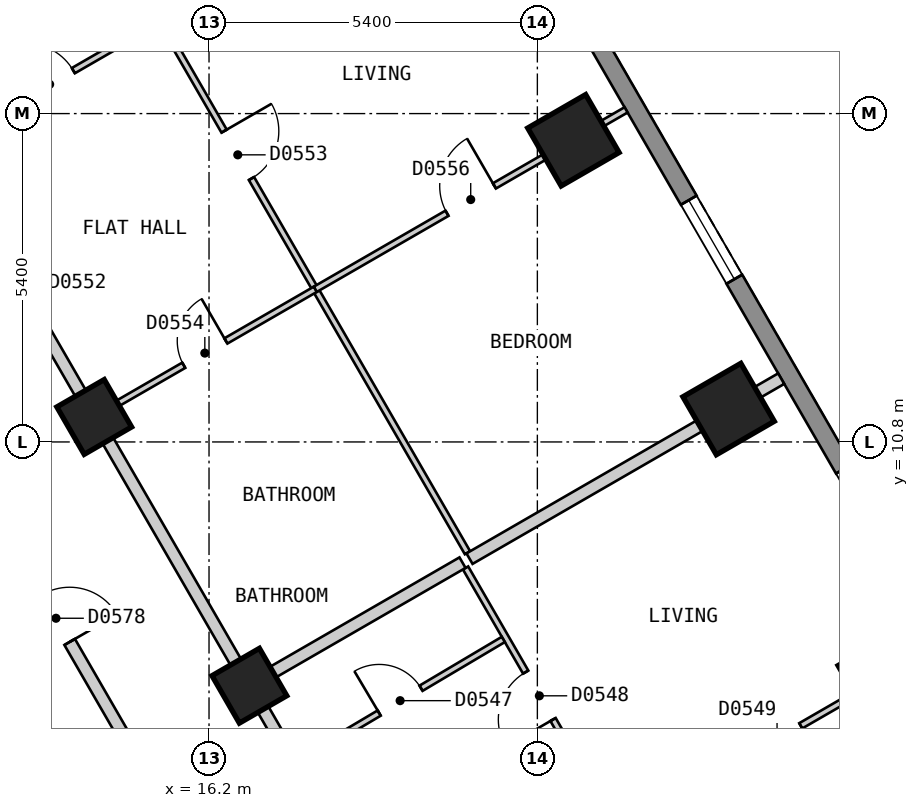
"""IFC4 building model, lengths in metres.
Left out: names, types, materials, properties, quantities, classifications, styles, units other than length and angle.
Written with IfcOpenShell. Run it as: python <this file> out.ifc"""

import sys

from ifc_helpers import new_model, si_unit, direction, frame, frame_2d, origin, origin_2d, place, context, subcontext, project, spatial, polyline, rectangle, outline, extrude, element, fill, save


model = new_model("IFC4")
c1 = context("Model", 3, precision=1e-05, world=origin(), true_north=direction((0.0, 1.0)))
c2 = subcontext(c1, "Body", "Model", "MODEL_VIEW")
j1 = project(units=[si_unit("LENGTHUNIT", "METRE"), si_unit("PLANEANGLEUNIT", "RADIAN")], contexts=[c1])
p1 = place(None, origin())
s1 = spatial("IfcSite", under=j1, at=p1, CompositionType="ELEMENT")
p2 = place(p1, origin())
s2 = spatial("IfcBuilding", under=s1, at=p2, CompositionType="ELEMENT")
p3 = place(p2, frame((0.0, 0.0, 56.4)))
s3 = spatial("IfcBuildingStorey", under=s2, at=p3, CompositionType="ELEMENT", Elevation=56.4)
for number, where, z_axis, x_axis in (
    (1, (27.297, 6.921, 0.0), (0.0, 0.0, 1.0), (-0.5, 0.866, 0.0)),
    (2, (24.745, 11.341, 0.0), (0.0, 0.0, 1.0), (-0.5, 0.866, 0.0)),
    (3, (22.193, 15.761, 0.0), (0.0, 0.0, 1.0), (-0.5, 0.866, 0.0)),
):
    element("IfcColumn", number, at=place(p3, frame(where, z_axis=z_axis, x_axis=x_axis)), inside=s3, PredefinedType="COLUMN", context=c2, shape_type="SweptSolid", body=[
        extrude(rectangle(XDim=1.1, YDim=1.1, at=origin_2d()), origin(), (0.0, 0.0, 1.0), 3.0),
    ])
for number, where, z_axis, x_axis in (
    (4, (16.864, 6.791, 0.0), (0.0, 0.0, 1.0), (-0.5, 0.866, 0.0)),
    (5, (14.312, 11.211, 0.0), (0.0, 0.0, 1.0), (-0.5, 0.866, 0.0)),
):
    element("IfcColumn", number, at=place(p3, frame(where, z_axis=z_axis, x_axis=x_axis)), inside=s3, PredefinedType="COLUMN", context=c2, shape_type="SweptSolid", body=[
        extrude(rectangle(XDim=0.9, YDim=0.9, at=origin_2d()), origin(), (0.0, 0.0, 1.0), 3.0),
    ])
p4 = place(p3, frame((31.22, 2.425, 0.0), z_axis=(0.0, 0.0, 1.0), x_axis=(-0.500001938803, 0.866024284413, 0.0)))
e6 = element("IfcWall", 6, at=p4, inside=s3, PredefinedType="SOLIDWALL", context=c2, shape_type="SweptSolid", body=[
    extrude(outline(polyline([(0.0, -0.15), (27.02, -0.15), (26.94, 0.15), (0.08, 0.15), (0.0, -0.15)])), origin(), (0.0, 0.0, 1.0), 2.7),
])
p5 = place(p4, frame((2.553, 0.0, 0.15)))
e7 = element("IfcOpeningElement", 7, at=p5, cuts=e6, PredefinedType="OPENING", context=c2, shape_type="SweptSolid", body=[
    extrude(rectangle(XDim=1.5, YDim=2.1, at=frame_2d((0.75, 1.05))), frame((0.0, 0.16, 0.0), z_axis=(0.0, -1.0, 0.0), x_axis=(1.0, 0.0, 0.0)), (0.0, 0.0, 1.0), 0.32),
])
p6 = place(p4, frame((7.657, 0.0, 0.15)))
e8 = element("IfcOpeningElement", 8, at=p6, cuts=e6, PredefinedType="OPENING", context=c2, shape_type="SweptSolid", body=[
    extrude(rectangle(XDim=1.5, YDim=2.1, at=frame_2d((0.75, 1.05))), frame((0.0, 0.16, 0.0), z_axis=(0.0, -1.0, 0.0), x_axis=(1.0, 0.0, 0.0)), (0.0, 0.0, 1.0), 0.32),
])
p7 = place(p4, frame((12.761, 0.0, 0.15)))
e9 = element("IfcOpeningElement", 9, at=p7, cuts=e6, PredefinedType="OPENING", context=c2, shape_type="SweptSolid", body=[
    extrude(rectangle(XDim=1.5, YDim=2.1, at=frame_2d((0.75, 1.05))), frame((0.0, 0.16, 0.0), z_axis=(0.0, -1.0, 0.0), x_axis=(1.0, 0.0, 0.0)), (0.0, 0.0, 1.0), 0.32),
])
p8 = place(p4, frame((17.865, 0.0, 0.15)))
e10 = element("IfcOpeningElement", 10, at=p8, cuts=e6, PredefinedType="OPENING", context=c2, shape_type="SweptSolid", body=[
    extrude(rectangle(XDim=1.5, YDim=2.1, at=frame_2d((0.75, 1.05))), frame((0.0, 0.16, 0.0), z_axis=(0.0, -1.0, 0.0), x_axis=(1.0, 0.0, 0.0)), (0.0, 0.0, 1.0), 0.32),
])
p9 = place(p4, frame((22.969, 0.0, 0.15)))
e11 = element("IfcOpeningElement", 11, at=p9, cuts=e6, PredefinedType="OPENING", context=c2, shape_type="SweptSolid", body=[
    extrude(rectangle(XDim=1.5, YDim=2.1, at=frame_2d((0.75, 1.05))), frame((0.0, 0.16, 0.0), z_axis=(0.0, -1.0, 0.0), x_axis=(1.0, 0.0, 0.0)), (0.0, 0.0, 1.0), 0.32),
])
p10 = place(p3, frame((9.18, 15.7, 0.0), z_axis=(0.0, 0.0, 1.0), x_axis=(0.500003652032, -0.866023295272, 0.0)))
e12 = element("IfcWall", 12, at=p10, inside=s3, PredefinedType="PARTITIONING", context=c2, shape_type="SweptSolid", body=[
    extrude(rectangle(XDim=18.012, YDim=0.2, at=frame_2d((9.006, 0.0))), origin(), (0.0, 0.0, 1.0), 2.7),
])
p11 = place(p10, frame((8.556, 0.0, 0.0)))
e13 = element("IfcOpeningElement", 13, at=p11, cuts=e12, PredefinedType="OPENING", context=c2, shape_type="SweptSolid", body=[
    extrude(rectangle(XDim=0.9, YDim=2.1, at=frame_2d((0.45, 1.05))), frame((0.0, 0.11, 0.0), z_axis=(0.0, -1.0, 0.0), x_axis=(1.0, 0.0, 0.0)), (0.0, 0.0, 1.0), 0.22),
])
p12 = place(p3, frame((10.45, 17.9, 0.0), z_axis=(0.0, 0.0, 1.0), x_axis=(0.500034352617, -0.866005569383, 0.0)))
e14 = element("IfcWall", 14, at=p12, inside=s3, PredefinedType="PARTITIONING", context=c2, shape_type="SweptSolid", body=[
    extrude(rectangle(XDim=20.553, YDim=0.2, at=frame_2d((10.276, 0.0))), origin(), (0.0, 0.0, 1.0), 2.7),
])
p13 = place(p12, frame((14.902, 0.0, 0.0)))
e15 = element("IfcOpeningElement", 15, at=p13, cuts=e14, PredefinedType="OPENING", context=c2, shape_type="SweptSolid", body=[
    extrude(rectangle(XDim=1.0, YDim=2.1, at=frame_2d((0.5, 1.05))), frame((0.0, 0.11, 0.0), z_axis=(0.0, -1.0, 0.0), x_axis=(1.0, 0.0, 0.0)), (0.0, 0.0, 1.0), 0.22),
])
p14 = place(p12, frame((4.671, 0.0, 0.0)))
e16 = element("IfcOpeningElement", 16, at=p14, cuts=e14, PredefinedType="OPENING", context=c2, shape_type="SweptSolid", body=[
    extrude(rectangle(XDim=1.0, YDim=2.1, at=frame_2d((0.5, 1.05))), frame((0.0, 0.11, 0.0), z_axis=(0.0, -1.0, 0.0), x_axis=(1.0, 0.0, 0.0)), (0.0, 0.0, 1.0), 0.22),
])
p15 = place(p3, frame((20.419, 8.728, 0.0), z_axis=(0.0, 0.0, 1.0), x_axis=(0.499958946799, -0.866049104564, 0.0)))
e17 = element("IfcWall", 17, at=p15, inside=s3, PredefinedType="PARTITIONING", context=c2, shape_type="SweptSolid", body=[
    extrude(rectangle(XDim=5.004, YDim=0.1, at=frame_2d((2.502, 0.0))), origin(), (0.0, 0.0, 1.0), 2.7),
])
p16 = place(p15, frame((1.978, 0.0, 0.0)))
e18 = element("IfcOpeningElement", 18, at=p16, cuts=e17, PredefinedType="OPENING", context=c2, shape_type="SweptSolid", body=[
    extrude(rectangle(XDim=0.9, YDim=2.1, at=frame_2d((0.45, 1.05))), frame((0.0, 0.06, 0.0), z_axis=(0.0, -1.0, 0.0), x_axis=(1.0, 0.0, 0.0)), (0.0, 0.0, 1.0), 0.12),
])
p17 = place(p3, frame((12.875, 22.1, 0.0), z_axis=(0.0, 0.0, 1.0), x_axis=(0.499994897061, -0.866028349948, 0.0)))
e19 = element("IfcWall", 19, at=p17, inside=s3, PredefinedType="PARTITIONING", context=c2, shape_type="SweptSolid", body=[
    extrude(rectangle(XDim=15.152, YDim=0.1, at=frame_2d((7.576, 0.0))), origin(), (0.0, 0.0, 1.0), 2.7),
])
p18 = place(p17, frame((7.146, 0.0, 0.0)))
e20 = element("IfcOpeningElement", 20, at=p18, cuts=e19, PredefinedType="OPENING", context=c2, shape_type="SweptSolid", body=[
    extrude(rectangle(XDim=0.9, YDim=2.1, at=frame_2d((0.45, 1.05))), frame((0.0, 0.06, 0.0), z_axis=(0.0, -1.0, 0.0), x_axis=(1.0, 0.0, 0.0)), (0.0, 0.0, 1.0), 0.12),
])
p19 = place(p3, frame((19.503, 2.421, 0.0), z_axis=(0.0, 0.0, 1.0), x_axis=(0.866065245018, 0.499930986609, 0.0)))
e21 = element("IfcWall", 21, at=p19, inside=s3, PredefinedType="PARTITIONING", context=c2, shape_type="SweptSolid", body=[
    extrude(rectangle(XDim=10.0, YDim=0.1, at=frame_2d((5.0, 0.0))), origin(), (0.0, 0.0, 1.0), 2.7),
])
p20 = place(p19, frame((6.523, 0.0, 0.0)))
e22 = element("IfcOpeningElement", 22, at=p20, cuts=e21, PredefinedType="OPENING", context=c2, shape_type="SweptSolid", body=[
    extrude(rectangle(XDim=0.9, YDim=2.1, at=frame_2d((0.45, 1.05))), frame((0.0, 0.06, 0.0), z_axis=(0.0, -1.0, 0.0), x_axis=(1.0, 0.0, 0.0)), (0.0, 0.0, 1.0), 0.12),
])
p21 = place(p3, frame((11.847, 15.681, 0.0), z_axis=(0.0, 0.0, 1.0), x_axis=(0.865980278416, 0.500078151287, 0.0)))
e23 = element("IfcWall", 23, at=p21, inside=s3, PredefinedType="PARTITIONING", context=c2, shape_type="SweptSolid", body=[
    extrude(rectangle(XDim=4.099, YDim=0.1, at=frame_2d((2.05, 0.0))), origin(), (0.0, 0.0, 1.0), 2.7),
])
p22 = place(p21, frame((1.55, 0.0, 0.0)))
e24 = element("IfcOpeningElement", 24, at=p22, cuts=e23, PredefinedType="OPENING", context=c2, shape_type="SweptSolid", body=[
    extrude(rectangle(XDim=0.9, YDim=2.1, at=frame_2d((0.45, 1.05))), frame((0.0, 0.06, 0.0), z_axis=(0.0, -1.0, 0.0), x_axis=(1.0, 0.0, 0.0)), (0.0, 0.0, 1.0), 0.12),
])
p23 = place(p3, frame((14.399, 11.261, 0.0), z_axis=(0.0, 0.0, 1.0), x_axis=(0.865980278416, 0.500078151287, 0.0)))
e25 = element("IfcWall", 25, at=p23, inside=s3, PredefinedType="PARTITIONING", context=c2, shape_type="SweptSolid", body=[
    extrude(rectangle(XDim=4.099, YDim=0.1, at=frame_2d((2.05, 0.0))), origin(), (0.0, 0.0, 1.0), 2.7),
])
p24 = place(p23, frame((1.6, 0.0, 0.0)))
e26 = element("IfcOpeningElement", 26, at=p24, cuts=e25, PredefinedType="OPENING", context=c2, shape_type="SweptSolid", body=[
    extrude(rectangle(XDim=0.8, YDim=2.1, at=frame_2d((0.4, 1.05))), frame((0.0, 0.06, 0.0), z_axis=(0.0, -1.0, 0.0), x_axis=(1.0, 0.0, 0.0)), (0.0, 0.0, 1.0), 0.12),
])
p25 = place(p3, frame((17.688, 5.564, 0.0), z_axis=(0.0, 0.0, 1.0), x_axis=(0.860107296662, 0.510113162179, 0.0)))
e27 = element("IfcWall", 27, at=p25, inside=s3, PredefinedType="PARTITIONING", context=c2, shape_type="SweptSolid", body=[
    extrude(rectangle(XDim=3.897, YDim=0.1, at=frame_2d((1.949, 0.0))), origin(), (0.0, 0.0, 1.0), 2.7),
])
p26 = place(p25, frame((1.524, 0.0, 0.0)))
e28 = element("IfcOpeningElement", 28, at=p26, cuts=e27, PredefinedType="OPENING", context=c2, shape_type="SweptSolid", body=[
    extrude(rectangle(XDim=0.8, YDim=2.1, at=frame_2d((0.4, 1.05))), frame((0.0, 0.06, 0.0), z_axis=(0.0, -1.0, 0.0), x_axis=(1.0, 0.0, 0.0)), (0.0, 0.0, 1.0), 0.12),
])
p27 = place(p3, frame((16.95, 6.841, 0.0), z_axis=(0.0, 0.0, 1.0), x_axis=(0.866031112038, 0.499990112884, 0.0)))
e29 = element("IfcWall", 29, at=p27, inside=s3, PredefinedType="PARTITIONING", context=c2, shape_type="SweptSolid", body=[
    extrude(rectangle(XDim=3.948, YDim=0.2, at=frame_2d((1.974, 0.0))), origin(), (0.0, 0.0, 1.0), 2.7),
])
p28 = place(p3, frame((20.484, 8.881, 0.0), z_axis=(0.0, 0.0, 1.0), x_axis=(0.866000821391, 0.500042575537, 0.0)))
e30 = element("IfcWall", 30, at=p28, inside=s3, PredefinedType="PARTITIONING", context=c2, shape_type="SweptSolid", body=[
    extrude(rectangle(XDim=5.919, YDim=0.2, at=frame_2d((2.96, 0.0))), origin(), (0.0, 0.0, 1.0), 2.7),
])
p29 = place(p3, frame((17.949, 13.311, 0.0), z_axis=(0.0, 0.0, 1.0), x_axis=(0.866052608538, 0.499952877023, 0.0)))
e31 = element("IfcWall", 31, at=p29, inside=s3, PredefinedType="PARTITIONING", context=c2, shape_type="SweptSolid", body=[
    extrude(rectangle(XDim=5.9, YDim=0.1, at=frame_2d((2.95, 0.0))), origin(), (0.0, 0.0, 1.0), 2.7),
])
p30 = place(p29, frame((2.5, 0.0, 0.0)))
e32 = element("IfcOpeningElement", 32, at=p30, cuts=e31, PredefinedType="OPENING", context=c2, shape_type="SweptSolid", body=[
    extrude(rectangle(XDim=0.9, YDim=2.1, at=frame_2d((0.45, 1.05))), frame((0.0, 0.06, 0.0), z_axis=(0.0, -1.0, 0.0), x_axis=(1.0, 0.0, 0.0)), (0.0, 0.0, 1.0), 0.12),
])
p31 = place(p7, origin())
e33 = element("IfcWindow", 33, at=p31, inside=s3, PartitioningType="SINGLE_PANEL", PredefinedType="WINDOW", context=c2, shape_type="SweptSolid", body=[
    extrude(rectangle(XDim=1.5, YDim=2.1, at=frame_2d((0.75, 1.05))), frame((0.0, 0.03, 0.0), z_axis=(0.0, -1.0, 0.0), x_axis=(1.0, 0.0, 0.0)), (0.0, 0.0, 1.0), 0.06),
])
fill(e9, e33)
p32 = place(p26, origin())
e34 = element("IfcDoor", 34, at=p32, inside=s3, OperationType="SINGLE_SWING_LEFT", PredefinedType="DOOR", context=c2, shape_type="SweptSolid", body=[
    extrude(rectangle(XDim=0.8, YDim=2.1, at=frame_2d((0.4, 1.05))), frame((0.0, 0.025, 0.0), z_axis=(0.0, -1.0, 0.0), x_axis=(1.0, 0.0, 0.0)), (0.0, 0.0, 1.0), 0.05),
])
fill(e28, e34)
p33 = place(p16, origin())
e35 = element("IfcDoor", 35, at=p33, inside=s3, OperationType="SINGLE_SWING_RIGHT", PredefinedType="DOOR", context=c2, shape_type="SweptSolid", body=[
    extrude(rectangle(XDim=0.9, YDim=2.1, at=frame_2d((0.45, 1.05))), frame((0.0, 0.025, 0.0), z_axis=(0.0, -1.0, 0.0), x_axis=(1.0, 0.0, 0.0)), (0.0, 0.0, 1.0), 0.05),
])
fill(e18, e35)
p34 = place(p20, origin())
e36 = element("IfcDoor", 36, at=p34, inside=s3, OperationType="SINGLE_SWING_LEFT", PredefinedType="DOOR", context=c2, shape_type="SweptSolid", body=[
    extrude(rectangle(XDim=0.9, YDim=2.1, at=frame_2d((0.45, 1.05))), frame((0.0, 0.025, 0.0), z_axis=(0.0, -1.0, 0.0), x_axis=(1.0, 0.0, 0.0)), (0.0, 0.0, 1.0), 0.05),
])
fill(e22, e36)
p35 = place(p18, origin())
e37 = element("IfcDoor", 37, at=p35, inside=s3, OperationType="SINGLE_SWING_LEFT", PredefinedType="DOOR", context=c2, shape_type="SweptSolid", body=[
    extrude(rectangle(XDim=0.9, YDim=2.1, at=frame_2d((0.45, 1.05))), frame((0.0, 0.025, 0.0), z_axis=(0.0, -1.0, 0.0), x_axis=(1.0, 0.0, 0.0)), (0.0, 0.0, 1.0), 0.05),
])
fill(e20, e37)
p36 = place(p24, origin())
e38 = element("IfcDoor", 38, at=p36, inside=s3, OperationType="SINGLE_SWING_RIGHT", PredefinedType="DOOR", context=c2, shape_type="SweptSolid", body=[
    extrude(rectangle(XDim=0.8, YDim=2.1, at=frame_2d((0.4, 1.05))), frame((0.0, 0.025, 0.0), z_axis=(0.0, -1.0, 0.0), x_axis=(1.0, 0.0, 0.0)), (0.0, 0.0, 1.0), 0.05),
])
fill(e26, e38)
p37 = place(p22, origin())
e39 = element("IfcDoor", 39, at=p37, inside=s3, OperationType="SINGLE_SWING_LEFT", PredefinedType="DOOR", context=c2, shape_type="SweptSolid", body=[
    extrude(rectangle(XDim=0.9, YDim=2.1, at=frame_2d((0.45, 1.05))), frame((0.0, 0.025, 0.0), z_axis=(0.0, -1.0, 0.0), x_axis=(1.0, 0.0, 0.0)), (0.0, 0.0, 1.0), 0.05),
])
fill(e24, e39)
p38 = place(p30, origin())
e40 = element("IfcDoor", 40, at=p38, inside=s3, OperationType="SINGLE_SWING_RIGHT", PredefinedType="DOOR", context=c2, shape_type="SweptSolid", body=[
    extrude(rectangle(XDim=0.9, YDim=2.1, at=frame_2d((0.45, 1.05))), frame((0.0, 0.025, 0.0), z_axis=(0.0, -1.0, 0.0), x_axis=(1.0, 0.0, 0.0)), (0.0, 0.0, 1.0), 0.05),
])
fill(e32, e40)
p39 = place(p11, origin())
e41 = element("IfcDoor", 41, at=p39, inside=s3, OperationType="SINGLE_SWING_RIGHT", PredefinedType="DOOR", context=c2, shape_type="SweptSolid", body=[
    extrude(rectangle(XDim=0.9, YDim=2.1, at=frame_2d((0.45, 1.05))), frame((0.0, 0.025, 0.0), z_axis=(0.0, -1.0, 0.0), x_axis=(1.0, 0.0, 0.0)), (0.0, 0.0, 1.0), 0.05),
])
fill(e13, e41)
save(model, sys.argv[1])
